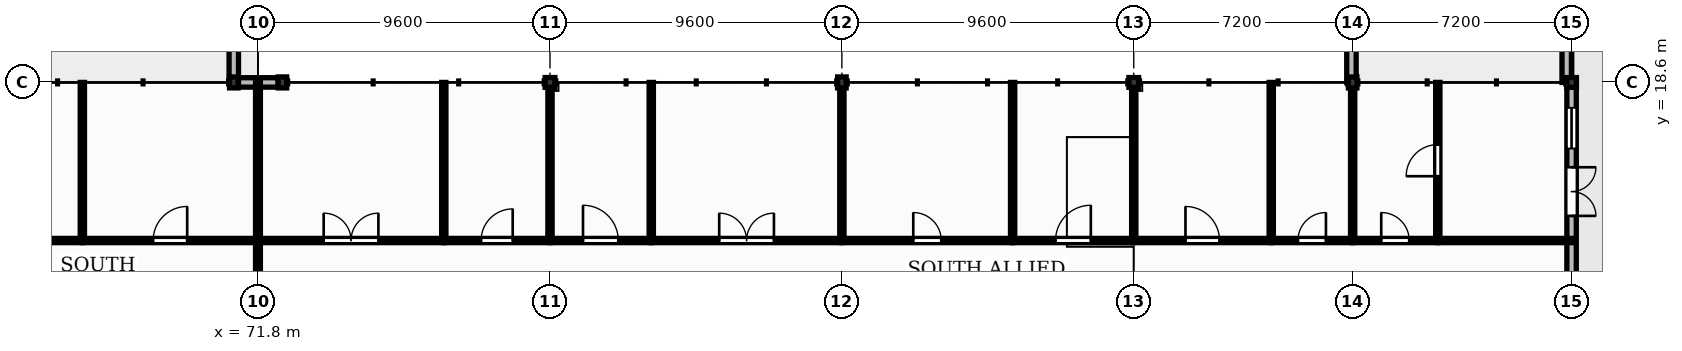
"""IFC4 building model, lengths in metres.
Left out: names, types, materials, properties, quantities, classifications, styles, units other than length and angle.
Written with IfcOpenShell. Run it as: python <this file> out.ifc"""

import sys

from ifc_helpers import new_model, si_unit, direction, frame, frame_2d, origin, origin_2d, place, context, subcontext, project, spatial, polyline, rectangle, outline, extrude, element, fill, save


model = new_model("IFC4")
c1 = context("Model", 3, precision=1e-05, world=origin(), true_north=direction((0.0, 1.0)))
c2 = subcontext(c1, "Body", "Model", "MODEL_VIEW")
j1 = project(units=[si_unit("LENGTHUNIT", "METRE"), si_unit("PLANEANGLEUNIT", "RADIAN")], contexts=[c1])
p1 = place(None, origin())
s1 = spatial("IfcSite", under=j1, at=p1, CompositionType="ELEMENT")
p2 = place(p1, origin())
s2 = spatial("IfcBuilding", under=s1, at=p2, CompositionType="ELEMENT")
p3 = place(p2, frame((0.0, 0.0, 9.0)))
s3 = spatial("IfcBuildingStorey", under=s2, at=p3, CompositionType="ELEMENT", Elevation=9.0)
p4 = place(p3, frame((72.6, 18.6, 0.0), z_axis=(0.0, 0.0, 1.0), x_axis=(1.0, 0.0, 0.0)))
e1 = element("IfcColumn", 1, at=p4, inside=s3, PredefinedType="COLUMN", context=c2, shape_type="SweptSolid", body=[
    extrude(rectangle(XDim=0.28, YDim=0.36, at=origin_2d()), origin(), (0.0, 0.0, 1.0), 3.99),
])
p5 = place(p3, frame((81.4, 18.6, 0.0), z_axis=(0.0, 0.0, 1.0), x_axis=(1.0, 0.0, 0.0)))
e2 = element("IfcColumn", 2, at=p5, inside=s3, PredefinedType="COLUMN", context=c2, shape_type="SweptSolid", body=[
    extrude(rectangle(XDim=0.32, YDim=0.32, at=origin_2d()), origin(), (0.0, 0.0, 1.0), 3.99),
])
p6 = place(p3, frame((91.0, 18.6, 0.0), z_axis=(0.0, 0.0, 1.0), x_axis=(1.0, 0.0, 0.0)))
e3 = element("IfcColumn", 3, at=p6, inside=s3, PredefinedType="COLUMN", context=c2, shape_type="SweptSolid", body=[
    extrude(rectangle(XDim=0.28, YDim=0.36, at=origin_2d()), origin(), (0.0, 0.0, 1.0), 3.99),
])
p7 = place(p3, frame((100.6, 18.6, 0.0), z_axis=(0.0, 0.0, 1.0), x_axis=(1.0, 0.0, 0.0)))
e4 = element("IfcColumn", 4, at=p7, inside=s3, PredefinedType="COLUMN", context=c2, shape_type="SweptSolid", body=[
    extrude(rectangle(XDim=0.32, YDim=0.32, at=origin_2d()), origin(), (0.0, 0.0, 1.0), 3.99),
])
p8 = place(p3, frame((107.8, 18.6, 0.0), z_axis=(0.0, 0.0, 1.0), x_axis=(1.0, 0.0, 0.0)))
e5 = element("IfcColumn", 5, at=p8, inside=s3, PredefinedType="COLUMN", context=c2, shape_type="SweptSolid", body=[
    extrude(rectangle(XDim=0.28, YDim=0.36, at=origin_2d()), origin(), (0.0, 0.0, 1.0), 3.98),
])
p9 = place(p3, frame((115.0, 18.6, 0.0), z_axis=(0.0, 0.0, 1.0), x_axis=(1.0, 0.0, 0.0)))
e6 = element("IfcColumn", 6, at=p9, inside=s3, PredefinedType="COLUMN", context=c2, shape_type="SweptSolid", body=[
    extrude(rectangle(XDim=0.32, YDim=0.32, at=origin_2d()), origin(), (0.0, 0.0, 1.0), 3.98),
])
p10 = place(p3, frame((71.0, 18.6, 0.0), z_axis=(0.0, 0.0, 1.0), x_axis=(1.0, 0.0, 0.0)))
e7 = element("IfcColumn", 7, at=p10, inside=s3, PredefinedType="COLUMN", context=c2, shape_type="SweptSolid", body=[
    extrude(rectangle(XDim=0.28, YDim=0.36, at=origin_2d()), origin(), (0.0, 0.0, 1.0), 3.99),
])
p11 = place(p3, frame((71.14, 18.6, 0.0), z_axis=(0.0, 0.0, 1.0), x_axis=(1.0, 0.0, 0.0)))
e8 = element("IfcWall", 8, at=p11, inside=s3, PredefinedType="SOLIDWALL", context=c2, shape_type="SweptSolid", body=[
    extrude(rectangle(XDim=0.595, YDim=0.31, at=frame_2d((0.298, 0.0))), origin(), (0.0, 0.0, 1.0), 3.99),
])
p12 = place(p3, frame((71.805, 18.6, 0.0), z_axis=(0.0, 0.0, 1.0), x_axis=(1.0, 0.0, 0.0)))
e9 = element("IfcWall", 9, at=p12, inside=s3, PredefinedType="SOLIDWALL", context=c2, shape_type="SweptSolid", body=[
    extrude(rectangle(XDim=0.655, YDim=0.31, at=frame_2d((0.328, 0.0))), origin(), (0.0, 0.0, 1.0), 3.99),
])
p13 = place(p3, frame((115.0, 11.58, 0.0), z_axis=(0.0, 0.0, 1.0), x_axis=(0.0, 1.0, 0.0)))
e10 = element("IfcWall", 10, at=p13, inside=s3, PredefinedType="SOLIDWALL", context=c2, shape_type="SweptSolid", body=[
    extrude(rectangle(XDim=6.86, YDim=0.31, at=frame_2d((3.43, 0.0))), origin(), (0.0, 0.0, 1.0), 3.52),
])
p14 = place(p13, frame((2.63, 0.0, 0.0)))
e11 = element("IfcOpeningElement", 11, at=p14, cuts=e10, PredefinedType="OPENING", context=c2, shape_type="SweptSolid", body=[
    extrude(rectangle(XDim=1.6, YDim=2.3, at=frame_2d((0.8, 1.15))), frame((0.0, 0.165, 0.0), z_axis=(0.0, -1.0, 0.0), x_axis=(1.0, 0.0, 0.0)), (0.0, 0.0, 1.0), 0.33),
])
p15 = place(p13, frame((4.845, 0.0, 1.0)))
e12 = element("IfcOpeningElement", 12, at=p15, cuts=e10, PredefinedType="OPENING", context=c2, shape_type="SweptSolid", body=[
    extrude(rectangle(XDim=1.34, YDim=1.95, at=frame_2d((0.67, 0.975))), frame((0.0, 0.165, 0.0), z_axis=(0.0, -1.0, 0.0), x_axis=(1.0, 0.0, 0.0)), (0.0, 0.0, 1.0), 0.33),
])
p16 = place(p3, frame((71.0, 18.6, 0.0), z_axis=(0.0, 0.0, 1.0), x_axis=(0.0, 1.0, 0.0)))
e13 = element("IfcWall", 13, at=p16, inside=s3, PredefinedType="SOLIDWALL", context=c2, shape_type="SweptSolid", body=[
    extrude(outline(polyline([(0.0, 0.0), (8.6, 0.0), (8.6, 0.05), (4.3, 2.16), (0.0, 0.05), (0.0, 0.0)])), frame((0.0, 0.155, 0.0), z_axis=(0.0, -1.0, 0.0), x_axis=(1.0, 0.0, 0.0)), (0.0, 0.0, 1.0), 0.31),
])
for number, where, z_axis, x_axis in (
    (14, (107.76, 18.6, 0.0), (0.0, 0.0, 1.0), (0.0, 1.0, 0.0)),
    (15, (114.84, 18.6, 0.0), (0.0, 0.0, 1.0), (0.0, 1.0, 0.0)),
):
    element("IfcWall", number, at=place(p3, frame(where, z_axis=z_axis, x_axis=x_axis)), inside=s3, PredefinedType="SOLIDWALL", context=c2, shape_type="SweptSolid", body=[
        extrude(outline(polyline([(0.0, 0.0), (8.6, 0.0), (8.6, 0.05), (4.3, 1.52), (0.0, 0.05), (0.0, 0.0)])), frame((0.0, 0.155, 0.0), z_axis=(0.0, -1.0, 0.0), x_axis=(1.0, 0.0, 0.0)), (0.0, 0.0, 1.0), 0.31),
    ])
p17 = place(p3, frame((62.2, 13.4, 0.0), z_axis=(0.0, 0.0, 1.0), x_axis=(1.0, 0.0, 0.0)))
e16 = element("IfcWall", 16, at=p17, inside=s3, PredefinedType="PARTITIONING", context=c2, shape_type="SweptSolid", body=[
    extrude(rectangle(XDim=3.819, YDim=0.14, at=frame_2d((1.91, 0.0))), origin(), (0.0, 0.0, 1.0), 3.96),
])
p18 = place(p17, frame((1.389, 0.0, 0.0)))
e17 = element("IfcOpeningElement", 17, at=p18, cuts=e16, PredefinedType="OPENING", context=c2, shape_type="SweptSolid", body=[
    extrude(rectangle(XDim=1.04, YDim=2.1, at=frame_2d((0.52, 1.05))), frame((0.0, 0.08, 0.0), z_axis=(0.0, -1.0, 0.0), x_axis=(1.0, 0.0, 0.0)), (0.0, 0.0, 1.0), 0.16),
])
p19 = place(p3, frame((66.019, 13.47, 0.0), z_axis=(0.0, 0.0, 1.0), x_axis=(0.0, 1.0, 0.0)))
e18 = element("IfcWall", 18, at=p19, inside=s3, PredefinedType="PARTITIONING", context=c2, shape_type="SweptSolid", body=[
    extrude(rectangle(XDim=5.13, YDim=0.14, at=frame_2d((2.565, 0.0))), origin(), (0.0, 0.0, 1.0), 3.96),
])
p20 = place(p3, frame((66.019, 13.4, 0.0), z_axis=(0.0, 0.0, 1.0), x_axis=(1.0, 0.0, 0.0)))
e19 = element("IfcWall", 19, at=p20, inside=s3, PredefinedType="PARTITIONING", context=c2, shape_type="SweptSolid", body=[
    extrude(rectangle(XDim=5.776, YDim=0.14, at=frame_2d((2.888, 0.0))), origin(), (0.0, 0.0, 1.0), 3.96),
])
p21 = place(p20, frame((2.328, 0.0, 0.0)))
e20 = element("IfcOpeningElement", 20, at=p21, cuts=e19, PredefinedType="OPENING", context=c2, shape_type="SweptSolid", body=[
    extrude(rectangle(XDim=1.12, YDim=2.15, at=frame_2d((0.56, 1.075))), frame((0.0, 0.08, 0.0), z_axis=(0.0, -1.0, 0.0), x_axis=(1.0, 0.0, 0.0)), (0.0, 0.0, 1.0), 0.16),
])
p22 = place(p3, frame((71.805, 13.4, 0.0), z_axis=(0.0, 0.0, 1.0), x_axis=(1.0, 0.0, 0.0)))
e21 = element("IfcWall", 21, at=p22, inside=s3, PredefinedType="PARTITIONING", context=c2, shape_type="SweptSolid", body=[
    extrude(rectangle(XDim=6.102, YDim=0.14, at=frame_2d((3.051, 0.0))), origin(), (0.0, 0.0, 1.0), 3.96),
])
p23 = place(p22, frame((2.151, 0.0, 0.0)))
e22 = element("IfcOpeningElement", 22, at=p23, cuts=e21, PredefinedType="OPENING", context=c2, shape_type="SweptSolid", body=[
    extrude(rectangle(XDim=1.8, YDim=2.3, at=frame_2d((0.9, 1.15))), frame((0.0, 0.08, 0.0), z_axis=(0.0, -1.0, 0.0), x_axis=(1.0, 0.0, 0.0)), (0.0, 0.0, 1.0), 0.16),
])
p24 = place(p3, frame((77.907, 13.47, 0.0), z_axis=(0.0, 0.0, 1.0), x_axis=(0.0, 1.0, 0.0)))
e23 = element("IfcWall", 23, at=p24, inside=s3, PredefinedType="PARTITIONING", context=c2, shape_type="SweptSolid", body=[
    extrude(rectangle(XDim=5.13, YDim=0.14, at=frame_2d((2.565, 0.0))), origin(), (0.0, 0.0, 1.0), 3.96),
])
p25 = place(p3, frame((77.907, 13.4, 0.0), z_axis=(0.0, 0.0, 1.0), x_axis=(1.0, 0.0, 0.0)))
e24 = element("IfcWall", 24, at=p25, inside=s3, PredefinedType="PARTITIONING", context=c2, shape_type="SweptSolid", body=[
    extrude(rectangle(XDim=3.493, YDim=0.14, at=frame_2d((1.747, 0.0))), origin(), (0.0, 0.0, 1.0), 3.96),
])
p26 = place(p25, frame((1.227, 0.0, 0.0)))
e25 = element("IfcOpeningElement", 25, at=p26, cuts=e24, PredefinedType="OPENING", context=c2, shape_type="SweptSolid", body=[
    extrude(rectangle(XDim=1.04, YDim=2.1, at=frame_2d((0.52, 1.05))), frame((0.0, 0.08, 0.0), z_axis=(0.0, -1.0, 0.0), x_axis=(1.0, 0.0, 0.0)), (0.0, 0.0, 1.0), 0.16),
])
p27 = place(p3, frame((81.4, 13.47, 0.0), z_axis=(0.0, 0.0, 1.0), x_axis=(0.0, 1.0, 0.0)))
e26 = element("IfcWall", 26, at=p27, inside=s3, PredefinedType="PARTITIONING", context=c2, shape_type="SweptSolid", body=[
    extrude(rectangle(XDim=4.97, YDim=0.14, at=frame_2d((2.485, 0.0))), origin(), (0.0, 0.0, 1.0), 3.47),
])
p28 = place(p3, frame((81.4, 13.4, 0.0), z_axis=(0.0, 0.0, 1.0), x_axis=(1.0, 0.0, 0.0)))
e27 = element("IfcWall", 27, at=p28, inside=s3, PredefinedType="PARTITIONING", context=c2, shape_type="SweptSolid", body=[
    extrude(rectangle(XDim=3.331, YDim=0.14, at=frame_2d((1.666, 0.0))), origin(), (0.0, 0.0, 1.0), 3.96),
])
p29 = place(p28, frame((1.085, 0.0, 0.0)))
e28 = element("IfcOpeningElement", 28, at=p29, cuts=e27, PredefinedType="OPENING", context=c2, shape_type="SweptSolid", body=[
    extrude(rectangle(XDim=1.16, YDim=2.1, at=frame_2d((0.58, 1.05))), frame((0.0, 0.08, 0.0), z_axis=(0.0, -1.0, 0.0), x_axis=(1.0, 0.0, 0.0)), (0.0, 0.0, 1.0), 0.16),
])
p30 = place(p3, frame((84.731, 13.47, 0.0), z_axis=(0.0, 0.0, 1.0), x_axis=(0.0, 1.0, 0.0)))
e29 = element("IfcWall", 29, at=p30, inside=s3, PredefinedType="PARTITIONING", context=c2, shape_type="SweptSolid", body=[
    extrude(rectangle(XDim=5.13, YDim=0.14, at=frame_2d((2.565, 0.0))), origin(), (0.0, 0.0, 1.0), 3.96),
])
p31 = place(p3, frame((84.731, 13.4, 0.0), z_axis=(0.0, 0.0, 1.0), x_axis=(1.0, 0.0, 0.0)))
e30 = element("IfcWall", 30, at=p31, inside=s3, PredefinedType="PARTITIONING", context=c2, shape_type="SweptSolid", body=[
    extrude(rectangle(XDim=6.269, YDim=0.14, at=frame_2d((3.135, 0.0))), origin(), (0.0, 0.0, 1.0), 3.96),
])
p32 = place(p31, frame((2.235, 0.0, 0.0)))
e31 = element("IfcOpeningElement", 31, at=p32, cuts=e30, PredefinedType="OPENING", context=c2, shape_type="SweptSolid", body=[
    extrude(rectangle(XDim=1.8, YDim=2.3, at=frame_2d((0.9, 1.15))), frame((0.0, 0.08, 0.0), z_axis=(0.0, -1.0, 0.0), x_axis=(1.0, 0.0, 0.0)), (0.0, 0.0, 1.0), 0.16),
])
p33 = place(p3, frame((91.0, 13.47, 0.0), z_axis=(0.0, 0.0, 1.0), x_axis=(0.0, 1.0, 0.0)))
e32 = element("IfcWall", 32, at=p33, inside=s3, PredefinedType="PARTITIONING", context=c2, shape_type="SweptSolid", body=[
    extrude(rectangle(XDim=4.95, YDim=0.14, at=frame_2d((2.475, 0.0))), origin(), (0.0, 0.0, 1.0), 3.47),
])
p34 = place(p3, frame((91.0, 13.4, 0.0), z_axis=(0.0, 0.0, 1.0), x_axis=(1.0, 0.0, 0.0)))
e33 = element("IfcWall", 33, at=p34, inside=s3, PredefinedType="PARTITIONING", context=c2, shape_type="SweptSolid", body=[
    extrude(rectangle(XDim=5.616, YDim=0.14, at=frame_2d((2.808, 0.0))), origin(), (0.0, 0.0, 1.0), 3.96),
])
p35 = place(p34, frame((2.348, 0.0, 0.0)))
e34 = element("IfcOpeningElement", 34, at=p35, cuts=e33, PredefinedType="OPENING", context=c2, shape_type="SweptSolid", body=[
    extrude(rectangle(XDim=0.92, YDim=2.1, at=frame_2d((0.46, 1.05))), frame((0.0, 0.08, 0.0), z_axis=(0.0, -1.0, 0.0), x_axis=(1.0, 0.0, 0.0)), (0.0, 0.0, 1.0), 0.16),
])
p36 = place(p3, frame((96.616, 13.47, 0.0), z_axis=(0.0, 0.0, 1.0), x_axis=(0.0, 1.0, 0.0)))
e35 = element("IfcWall", 35, at=p36, inside=s3, PredefinedType="PARTITIONING", context=c2, shape_type="SweptSolid", body=[
    extrude(rectangle(XDim=5.13, YDim=0.14, at=frame_2d((2.565, 0.0))), origin(), (0.0, 0.0, 1.0), 3.96),
])
p37 = place(p3, frame((96.616, 13.4, 0.0), z_axis=(0.0, 0.0, 1.0), x_axis=(1.0, 0.0, 0.0)))
e36 = element("IfcWall", 36, at=p37, inside=s3, PredefinedType="PARTITIONING", context=c2, shape_type="SweptSolid", body=[
    extrude(rectangle(XDim=3.984, YDim=0.14, at=frame_2d((1.992, 0.0))), origin(), (0.0, 0.0, 1.0), 3.96),
])
p38 = place(p37, frame((1.412, 0.0, 0.0)))
e37 = element("IfcOpeningElement", 37, at=p38, cuts=e36, PredefinedType="OPENING", context=c2, shape_type="SweptSolid", body=[
    extrude(rectangle(XDim=1.16, YDim=2.1, at=frame_2d((0.58, 1.05))), frame((0.0, 0.08, 0.0), z_axis=(0.0, -1.0, 0.0), x_axis=(1.0, 0.0, 0.0)), (0.0, 0.0, 1.0), 0.16),
])
p39 = place(p3, frame((100.6, 13.47, 0.0), z_axis=(0.0, 0.0, 1.0), x_axis=(0.0, 1.0, 0.0)))
e38 = element("IfcWall", 38, at=p39, inside=s3, PredefinedType="PARTITIONING", context=c2, shape_type="SweptSolid", body=[
    extrude(rectangle(XDim=4.97, YDim=0.14, at=frame_2d((2.485, 0.0))), origin(), (0.0, 0.0, 1.0), 3.47),
])
p40 = place(p3, frame((100.6, 13.4, 0.0), z_axis=(0.0, 0.0, 1.0), x_axis=(1.0, 0.0, 0.0)))
e39 = element("IfcWall", 39, at=p40, inside=s3, PredefinedType="PARTITIONING", context=c2, shape_type="SweptSolid", body=[
    extrude(rectangle(XDim=4.522, YDim=0.14, at=frame_2d((2.261, 0.0))), origin(), (0.0, 0.0, 1.0), 3.96),
])
p41 = place(p40, frame((1.701, 0.0, 0.0)))
e40 = element("IfcOpeningElement", 40, at=p41, cuts=e39, PredefinedType="OPENING", context=c2, shape_type="SweptSolid", body=[
    extrude(rectangle(XDim=1.12, YDim=2.15, at=frame_2d((0.56, 1.075))), frame((0.0, 0.08, 0.0), z_axis=(0.0, -1.0, 0.0), x_axis=(1.0, 0.0, 0.0)), (0.0, 0.0, 1.0), 0.16),
])
p42 = place(p3, frame((105.122, 13.47, 0.0), z_axis=(0.0, 0.0, 1.0), x_axis=(0.0, 1.0, 0.0)))
e41 = element("IfcWall", 41, at=p42, inside=s3, PredefinedType="PARTITIONING", context=c2, shape_type="SweptSolid", body=[
    extrude(rectangle(XDim=5.13, YDim=0.14, at=frame_2d((2.565, 0.0))), origin(), (0.0, 0.0, 1.0), 3.96),
])
p43 = place(p3, frame((105.122, 13.4, 0.0), z_axis=(0.0, 0.0, 1.0), x_axis=(1.0, 0.0, 0.0)))
e42 = element("IfcWall", 42, at=p43, inside=s3, PredefinedType="PARTITIONING", context=c2, shape_type="SweptSolid", body=[
    extrude(rectangle(XDim=2.678, YDim=0.14, at=frame_2d((1.339, 0.0))), origin(), (0.0, 0.0, 1.0), 3.96),
])
p44 = place(p43, frame((0.879, 0.0, 0.0)))
e43 = element("IfcOpeningElement", 43, at=p44, cuts=e42, PredefinedType="OPENING", context=c2, shape_type="SweptSolid", body=[
    extrude(rectangle(XDim=0.92, YDim=2.1, at=frame_2d((0.46, 1.05))), frame((0.0, 0.08, 0.0), z_axis=(0.0, -1.0, 0.0), x_axis=(1.0, 0.0, 0.0)), (0.0, 0.0, 1.0), 0.16),
])
p45 = place(p3, frame((107.8, 13.47, 0.0), z_axis=(0.0, 0.0, 1.0), x_axis=(0.0, 1.0, 0.0)))
e44 = element("IfcWall", 44, at=p45, inside=s3, PredefinedType="PARTITIONING", context=c2, shape_type="SweptSolid", body=[
    extrude(rectangle(XDim=4.95, YDim=0.14, at=frame_2d((2.475, 0.0))), origin(), (0.0, 0.0, 1.0), 3.52),
])
p46 = place(p3, frame((107.8, 13.4, 0.0), z_axis=(0.0, 0.0, 1.0), x_axis=(1.0, 0.0, 0.0)))
e45 = element("IfcWall", 45, at=p46, inside=s3, PredefinedType="PARTITIONING", context=c2, shape_type="SweptSolid", body=[
    extrude(rectangle(XDim=2.8, YDim=0.14, at=frame_2d((1.4, 0.0))), origin(), (0.0, 0.0, 1.0), 3.96),
])
p47 = place(p46, frame((0.94, 0.0, 0.0)))
e46 = element("IfcOpeningElement", 46, at=p47, cuts=e45, PredefinedType="OPENING", context=c2, shape_type="SweptSolid", body=[
    extrude(rectangle(XDim=0.92, YDim=2.1, at=frame_2d((0.46, 1.05))), frame((0.0, 0.08, 0.0), z_axis=(0.0, -1.0, 0.0), x_axis=(1.0, 0.0, 0.0)), (0.0, 0.0, 1.0), 0.16),
])
p48 = place(p3, frame((110.6, 13.47, 0.0), z_axis=(0.0, 0.0, 1.0), x_axis=(0.0, 1.0, 0.0)))
e47 = element("IfcWall", 47, at=p48, inside=s3, PredefinedType="PARTITIONING", context=c2, shape_type="SweptSolid", body=[
    extrude(rectangle(XDim=5.13, YDim=0.14, at=frame_2d((2.565, 0.0))), origin(), (0.0, 0.0, 1.0), 3.96),
])
p49 = place(p48, frame((2.045, 0.0, 0.0)))
e48 = element("IfcOpeningElement", 48, at=p49, cuts=e47, PredefinedType="OPENING", context=c2, shape_type="SweptSolid", body=[
    extrude(rectangle(XDim=1.04, YDim=2.1, at=frame_2d((0.52, 1.05))), frame((0.0, 0.08, 0.0), z_axis=(0.0, -1.0, 0.0), x_axis=(1.0, 0.0, 0.0)), (0.0, 0.0, 1.0), 0.16),
])
p50 = place(p3, frame((110.6, 13.4, 0.0), z_axis=(0.0, 0.0, 1.0), x_axis=(1.0, 0.0, 0.0)))
e49 = element("IfcWall", 49, at=p50, inside=s3, PredefinedType="PARTITIONING", context=c2, shape_type="SweptSolid", body=[
    extrude(rectangle(XDim=4.4, YDim=0.14, at=frame_2d((2.2, 0.0))), origin(), (0.0, 0.0, 1.0), 3.96),
])
p51 = place(p3, frame((71.795, 10.87, 0.0), z_axis=(0.0, 0.0, 1.0), x_axis=(0.0, 1.0, 0.0)))
e50 = element("IfcWall", 50, at=p51, inside=s3, PredefinedType="PARTITIONING", context=c2, shape_type="SweptSolid", body=[
    extrude(rectangle(XDim=2.46, YDim=0.16, at=frame_2d((1.23, 0.0))), origin(), (0.0, 0.0, 1.0), 3.96),
])
p52 = place(p3, frame((71.795, 13.47, 0.0), z_axis=(0.0, 0.0, 1.0), x_axis=(0.0, 1.0, 0.0)))
e51 = element("IfcWall", 51, at=p52, inside=s3, PredefinedType="PARTITIONING", context=c2, shape_type="SweptSolid", body=[
    extrude(rectangle(XDim=5.13, YDim=0.16, at=frame_2d((2.565, 0.0))), origin(), (0.0, 0.0, 1.0), 3.96),
])
p53 = place(p14, frame((1.6, 0.0, 0.0), z_axis=(0.0, 0.0, 1.0), x_axis=(-1.0, 0.0, 0.0)))
e52 = element("IfcDoor", 52, at=p53, inside=s3, OperationType="DOUBLE_DOOR_SINGLE_SWING", PredefinedType="DOOR", context=c2, shape_type="SweptSolid", body=[
    extrude(rectangle(XDim=1.6, YDim=2.3, at=frame_2d((0.8, 1.15))), frame((0.0, 0.025, 0.0), z_axis=(0.0, -1.0, 0.0), x_axis=(1.0, 0.0, 0.0)), (0.0, 0.0, 1.0), 0.05),
])
fill(e11, e52)
p54 = place(p15, origin())
e53 = element("IfcWindow", 53, at=p54, inside=s3, PartitioningType="SINGLE_PANEL", PredefinedType="WINDOW", context=c2, shape_type="SweptSolid", body=[
    extrude(rectangle(XDim=1.34, YDim=1.95, at=frame_2d((0.67, 0.975))), frame((0.0, 0.03, 0.0), z_axis=(0.0, -1.0, 0.0), x_axis=(1.0, 0.0, 0.0)), (0.0, 0.0, 1.0), 0.06),
])
fill(e12, e53)
p55 = place(p47, origin())
e54 = element("IfcDoor", 54, at=p55, inside=s3, OperationType="SINGLE_SWING_LEFT", PredefinedType="DOOR", context=c2, shape_type="SweptSolid", body=[
    extrude(rectangle(XDim=0.92, YDim=2.1, at=frame_2d((0.46, 1.05))), frame((0.0, 0.025, 0.0), z_axis=(0.0, -1.0, 0.0), x_axis=(1.0, 0.0, 0.0)), (0.0, 0.0, 1.0), 0.05),
])
fill(e46, e54)
p56 = place(p21, origin())
e55 = element("IfcDoor", 55, at=p56, inside=s3, OperationType="SINGLE_SWING_RIGHT", PredefinedType="DOOR", context=c2, shape_type="SweptSolid", body=[
    extrude(rectangle(XDim=1.12, YDim=2.15, at=frame_2d((0.56, 1.075))), frame((0.0, 0.025, 0.0), z_axis=(0.0, -1.0, 0.0), x_axis=(1.0, 0.0, 0.0)), (0.0, 0.0, 1.0), 0.05),
])
fill(e20, e55)
p57 = place(p23, origin())
e56 = element("IfcDoor", 56, at=p57, inside=s3, OperationType="DOUBLE_DOOR_SINGLE_SWING", PredefinedType="DOOR", context=c2, shape_type="SweptSolid", body=[
    extrude(rectangle(XDim=1.8, YDim=2.3, at=frame_2d((0.9, 1.15))), frame((0.0, 0.025, 0.0), z_axis=(0.0, -1.0, 0.0), x_axis=(1.0, 0.0, 0.0)), (0.0, 0.0, 1.0), 0.05),
])
fill(e22, e56)
p58 = place(p26, origin())
e57 = element("IfcDoor", 57, at=p58, inside=s3, OperationType="SINGLE_SWING_RIGHT", PredefinedType="DOOR", context=c2, shape_type="SweptSolid", body=[
    extrude(rectangle(XDim=1.04, YDim=2.1, at=frame_2d((0.52, 1.05))), frame((0.0, 0.025, 0.0), z_axis=(0.0, -1.0, 0.0), x_axis=(1.0, 0.0, 0.0)), (0.0, 0.0, 1.0), 0.05),
])
fill(e25, e57)
p59 = place(p29, origin())
e58 = element("IfcDoor", 58, at=p59, inside=s3, OperationType="SINGLE_SWING_LEFT", PredefinedType="DOOR", context=c2, shape_type="SweptSolid", body=[
    extrude(rectangle(XDim=1.16, YDim=2.1, at=frame_2d((0.58, 1.05))), frame((0.0, 0.025, 0.0), z_axis=(0.0, -1.0, 0.0), x_axis=(1.0, 0.0, 0.0)), (0.0, 0.0, 1.0), 0.05),
])
fill(e28, e58)
p60 = place(p32, origin())
e59 = element("IfcDoor", 59, at=p60, inside=s3, OperationType="DOUBLE_DOOR_SINGLE_SWING", PredefinedType="DOOR", context=c2, shape_type="SweptSolid", body=[
    extrude(rectangle(XDim=1.8, YDim=2.3, at=frame_2d((0.9, 1.15))), frame((0.0, 0.025, 0.0), z_axis=(0.0, -1.0, 0.0), x_axis=(1.0, 0.0, 0.0)), (0.0, 0.0, 1.0), 0.05),
])
fill(e31, e59)
p61 = place(p35, origin())
e60 = element("IfcDoor", 60, at=p61, inside=s3, OperationType="SINGLE_SWING_LEFT", PredefinedType="DOOR", context=c2, shape_type="SweptSolid", body=[
    extrude(rectangle(XDim=0.92, YDim=2.1, at=frame_2d((0.46, 1.05))), frame((0.0, 0.025, 0.0), z_axis=(0.0, -1.0, 0.0), x_axis=(1.0, 0.0, 0.0)), (0.0, 0.0, 1.0), 0.05),
])
fill(e34, e60)
p62 = place(p38, origin())
e61 = element("IfcDoor", 61, at=p62, inside=s3, OperationType="SINGLE_SWING_RIGHT", PredefinedType="DOOR", context=c2, shape_type="SweptSolid", body=[
    extrude(rectangle(XDim=1.16, YDim=2.1, at=frame_2d((0.58, 1.05))), frame((0.0, 0.025, 0.0), z_axis=(0.0, -1.0, 0.0), x_axis=(1.0, 0.0, 0.0)), (0.0, 0.0, 1.0), 0.05),
])
fill(e37, e61)
p63 = place(p41, origin())
e62 = element("IfcDoor", 62, at=p63, inside=s3, OperationType="SINGLE_SWING_LEFT", PredefinedType="DOOR", context=c2, shape_type="SweptSolid", body=[
    extrude(rectangle(XDim=1.12, YDim=2.15, at=frame_2d((0.56, 1.075))), frame((0.0, 0.025, 0.0), z_axis=(0.0, -1.0, 0.0), x_axis=(1.0, 0.0, 0.0)), (0.0, 0.0, 1.0), 0.05),
])
fill(e40, e62)
p64 = place(p44, origin())
e63 = element("IfcDoor", 63, at=p64, inside=s3, OperationType="SINGLE_SWING_RIGHT", PredefinedType="DOOR", context=c2, shape_type="SweptSolid", body=[
    extrude(rectangle(XDim=0.92, YDim=2.1, at=frame_2d((0.46, 1.05))), frame((0.0, 0.025, 0.0), z_axis=(0.0, -1.0, 0.0), x_axis=(1.0, 0.0, 0.0)), (0.0, 0.0, 1.0), 0.05),
])
fill(e43, e63)
p65 = place(p49, origin())
e64 = element("IfcDoor", 64, at=p65, inside=s3, OperationType="SINGLE_SWING_LEFT", PredefinedType="DOOR", context=c2, shape_type="SweptSolid", body=[
    extrude(rectangle(XDim=1.04, YDim=2.1, at=frame_2d((0.52, 1.05))), frame((0.0, 0.025, 0.0), z_axis=(0.0, -1.0, 0.0), x_axis=(1.0, 0.0, 0.0)), (0.0, 0.0, 1.0), 0.05),
])
fill(e48, e64)
save(model, sys.argv[1])
